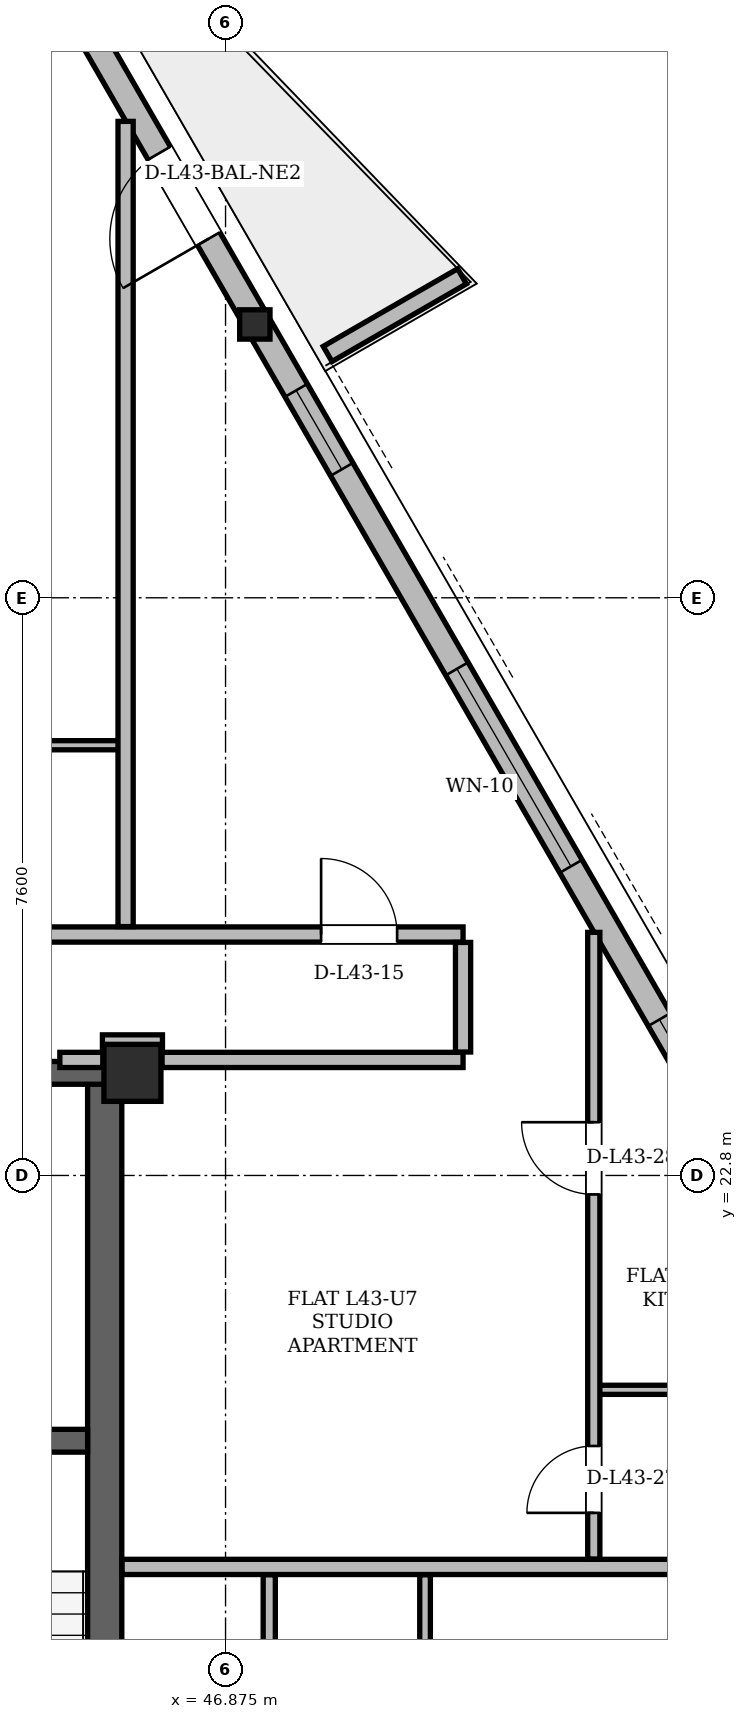
"""IFC4 building model, lengths in metres.
Left out: names, types, materials, properties, quantities, classifications, styles, units other than length and angle.
Written with IfcOpenShell. Run it as: python <this file> out.ifc"""

import sys

from ifc_helpers import new_model, si_unit, direction, frame, frame_2d, origin, origin_2d, place, context, subcontext, project, spatial, polyline, rectangle, hollow_rectangle, i_section, outline, extrude, element, fill, save


model = new_model("IFC4")
c1 = context("Model", 3, precision=1e-05, world=origin(), true_north=direction((0.0, 1.0)))
c2 = subcontext(c1, "Body", "Model", "MODEL_VIEW")
j1 = project(units=[si_unit("LENGTHUNIT", "METRE"), si_unit("PLANEANGLEUNIT", "RADIAN")], contexts=[c1])
p1 = place(None, origin())
s1 = spatial("IfcSite", under=j1, at=p1, CompositionType="ELEMENT")
p2 = place(p1, origin())
s2 = spatial("IfcBuilding", under=s1, at=p2, CompositionType="ELEMENT")
p3 = place(p2, frame((0.0, 0.0, 163.8)))
s3 = spatial("IfcBuildingStorey", under=s2, at=p3, CompositionType="ELEMENT", Elevation=163.8)
p4 = place(p3, frame((45.65, 24.15, 0.0), z_axis=(0.0, 0.0, 1.0), x_axis=(1.0, 0.0, 0.0)))
e1 = element("IfcColumn", 1, at=p4, inside=s3, PredefinedType="COLUMN", context=c2, shape_type="SweptSolid", body=[
    extrude(hollow_rectangle(XDim=0.75, YDim=0.75, WallThickness=0.06, at=origin_2d()), origin(), (0.0, 0.0, 1.0), 3.6),
])
p5 = place(p3, frame((47.296, 34.009, 0.004), z_axis=(-0.019779412159, -0.007272842272, 0.999777915649), x_axis=(0.345107427602, -0.938563190954, 0.0)))
e2 = element("IfcColumn", 2, at=p5, inside=s3, PredefinedType="COLUMN", context=c2, shape_type="SweptSolid", body=[
    extrude(i_section(OverallWidth=0.399, OverallDepth=0.386, WebThickness=0.021, FlangeThickness=0.033, at=origin_2d()), origin(), (0.0, 0.0, 1.0), 3.592),
])
p6 = place(p3, frame((45.285, 11.0, 0.0), z_axis=(0.0, 0.0, 1.0), x_axis=(0.0, 1.0, 0.0)))
e3 = element("IfcWall", 3, at=p6, inside=s3, PredefinedType="SHEAR", context=c2, shape_type="SweptSolid", body=[
    extrude(rectangle(XDim=13.3, YDim=0.45, at=frame_2d((6.65, 0.0))), origin(), (0.0, 0.0, 1.0), 3.38),
])
p7 = place(p3, frame((29.65, 24.15, 0.0), z_axis=(0.0, 0.0, 1.0), x_axis=(1.0, 0.0, 0.0)))
e4 = element("IfcWall", 4, at=p7, inside=s3, PredefinedType="SHEAR", context=c2, shape_type="SweptSolid", body=[
    extrude(rectangle(XDim=15.7, YDim=0.3, at=frame_2d((7.85, 0.0))), origin(), (0.0, 0.0, 1.0), 3.38),
])
p8 = place(p7, frame((1.7, 0.0, 0.0)))
e5 = element("IfcOpeningElement", 5, at=p8, cuts=e4, PredefinedType="OPENING", context=c2, shape_type="SweptSolid", body=[
    extrude(rectangle(XDim=1.2, YDim=2.2, at=frame_2d((0.6, 1.1))), frame((0.0, 0.15, 0.0), z_axis=(0.0, -1.0, 0.0), x_axis=(1.0, 0.0, 0.0)), (0.0, 0.0, 1.0), 0.3),
])
p9 = place(p7, frame((12.8, 0.0, 0.0)))
e6 = element("IfcOpeningElement", 6, at=p9, cuts=e4, PredefinedType="OPENING", context=c2, shape_type="SweptSolid", body=[
    extrude(rectangle(XDim=1.2, YDim=2.2, at=frame_2d((0.6, 1.1))), frame((0.0, 0.15, 0.0), z_axis=(0.0, -1.0, 0.0), x_axis=(1.0, 0.0, 0.0)), (0.0, 0.0, 1.0), 0.3),
])
p10 = place(p7, frame((6.55, 0.0, 0.0)))
e7 = element("IfcOpeningElement", 7, at=p10, cuts=e4, PredefinedType="OPENING", context=c2, shape_type="SweptSolid", body=[
    extrude(rectangle(XDim=0.9, YDim=2.05, at=frame_2d((0.45, 1.025))), frame((0.0, 0.15, 0.0), z_axis=(0.0, -1.0, 0.0), x_axis=(1.0, 0.0, 0.0)), (0.0, 0.0, 1.0), 0.3),
])
p11 = place(p7, frame((8.45, 0.0, 0.0)))
e8 = element("IfcOpeningElement", 8, at=p11, cuts=e4, PredefinedType="OPENING", context=c2, shape_type="SweptSolid", body=[
    extrude(rectangle(XDim=0.9, YDim=2.05, at=frame_2d((0.45, 1.025))), frame((0.0, 0.15, 0.0), z_axis=(0.0, -1.0, 0.0), x_axis=(1.0, 0.0, 0.0)), (0.0, 0.0, 1.0), 0.3),
])
p12 = place(p3, frame((41.05, 19.31, 0.0), z_axis=(0.0, 0.0, 1.0), x_axis=(1.0, 0.0, 0.0)))
e9 = element("IfcWall", 9, at=p12, inside=s3, PredefinedType="SHEAR", context=c2, shape_type="SweptSolid", body=[
    extrude(rectangle(XDim=4.01, YDim=0.3, at=frame_2d((2.005, 0.0))), origin(), (0.0, 0.0, 1.0), 3.38),
])
p13 = place(p12, frame((1.6, 0.0, 0.0)))
e10 = element("IfcOpeningElement", 10, at=p13, cuts=e9, PredefinedType="OPENING", context=c2, shape_type="SweptSolid", body=[
    extrude(rectangle(XDim=1.4, YDim=2.2, at=frame_2d((0.7, 1.1))), frame((0.0, 0.15, 0.0), z_axis=(0.0, -1.0, 0.0), x_axis=(1.0, 0.0, 0.0)), (0.0, 0.0, 1.0), 0.3),
])
p14 = place(p3, frame((59.804, 12.344, 0.0), z_axis=(0.0, 0.0, 1.0), x_axis=(-0.499998611639, 0.866026205354, 0.0)))
e11 = element("IfcWall", 11, at=p14, inside=s3, PredefinedType="SOLIDWALL", context=c2, shape_type="SweptSolid", body=[
    extrude(rectangle(XDim=35.738, YDim=0.34, at=frame_2d((17.869, 0.0))), origin(), (0.0, 0.0, 1.0), 2.6),
])
p15 = place(p14, frame((6.579, 0.0, 0.0)))
e12 = element("IfcOpeningElement", 12, at=p15, cuts=e11, PredefinedType="OPENING", context=c2, shape_type="SweptSolid", body=[
    extrude(rectangle(XDim=1.5, YDim=2.2, at=frame_2d((0.75, 1.1))), frame((0.0, 0.17, 0.0), z_axis=(0.0, -1.0, 0.0), x_axis=(1.0, 0.0, 0.0)), (0.0, 0.0, 1.0), 0.34),
])
p16 = place(p14, frame((26.303, 0.0, 0.0)))
e13 = element("IfcOpeningElement", 13, at=p16, cuts=e11, PredefinedType="OPENING", context=c2, shape_type="SweptSolid", body=[
    extrude(rectangle(XDim=1.3, YDim=2.2, at=frame_2d((0.65, 1.1))), frame((0.0, 0.17, 0.0), z_axis=(0.0, -1.0, 0.0), x_axis=(1.0, 0.0, 0.0)), (0.0, 0.0, 1.0), 0.34),
])
p17 = place(p14, frame((1.58, 0.0, 0.85)))
e14 = element("IfcOpeningElement", 14, at=p17, cuts=e11, PredefinedType="OPENING", context=c2, shape_type="SweptSolid", body=[
    extrude(rectangle(XDim=1.2, YDim=1.48, at=frame_2d((0.6, 0.74))), frame((0.0, 0.17, 0.0), z_axis=(0.0, -1.0, 0.0), x_axis=(1.0, 0.0, 0.0)), (0.0, 0.0, 1.0), 0.34),
])
p18 = place(p14, frame((16.77, 0.0, 0.85)))
e15 = element("IfcOpeningElement", 15, at=p18, cuts=e11, PredefinedType="OPENING", context=c2, shape_type="SweptSolid", body=[
    extrude(rectangle(XDim=3.0, YDim=1.64, at=frame_2d((1.5, 0.82))), frame((0.0, 0.17, 0.0), z_axis=(0.0, -1.0, 0.0), x_axis=(1.0, 0.0, 0.0)), (0.0, 0.0, 1.0), 0.34),
])
p19 = place(p14, frame((22.8, 0.0, 0.85)))
e16 = element("IfcOpeningElement", 16, at=p19, cuts=e11, PredefinedType="OPENING", context=c2, shape_type="SweptSolid", body=[
    extrude(rectangle(XDim=1.2, YDim=1.48, at=frame_2d((0.6, 0.74))), frame((0.0, 0.17, 0.0), z_axis=(0.0, -1.0, 0.0), x_axis=(1.0, 0.0, 0.0)), (0.0, 0.0, 1.0), 0.34),
])
p20 = place(p14, frame((13.242, 0.0, 0.85)))
e17 = element("IfcOpeningElement", 17, at=p20, cuts=e11, PredefinedType="OPENING", context=c2, shape_type="SweptSolid", body=[
    extrude(rectangle(XDim=1.2, YDim=1.48, at=frame_2d((0.6, 0.74))), frame((0.0, 0.17, 0.0), z_axis=(0.0, -1.0, 0.0), x_axis=(1.0, 0.0, 0.0)), (0.0, 0.0, 1.0), 0.34),
])
p21 = place(p14, frame((31.395, 0.0, 0.85)))
e18 = element("IfcOpeningElement", 18, at=p21, cuts=e11, PredefinedType="OPENING", context=c2, shape_type="SweptSolid", body=[
    extrude(rectangle(XDim=3.0, YDim=1.64, at=frame_2d((1.5, 0.82))), frame((0.0, 0.17, 0.0), z_axis=(0.0, -1.0, 0.0), x_axis=(1.0, 0.0, 0.0)), (0.0, 0.0, 1.0), 0.34),
])
p22 = place(p3, frame((48.218, 33.608, 0.0), z_axis=(0.0, 0.0, 1.0), x_axis=(0.866012356593, 0.500022597718, 0.0)))
e19 = element("IfcWall", 19, at=p22, inside=s3, PredefinedType="PARAPET", context=c2, shape_type="SweptSolid", body=[
    extrude(outline(polyline([(0.0, 0.0), (2.042, 0.0), (2.042, 1.1), (0.0, 1.32), (0.0, 0.0)])), frame((0.0, 0.115, 0.0), z_axis=(0.0, -1.0, 0.0), x_axis=(1.0, 0.0, 0.0)), (0.0, 0.0, 1.0), 0.23),
])
p23 = place(p3, frame((45.514, 17.65, 0.0), z_axis=(0.0, 0.0, 1.0), x_axis=(1.0, 0.0, 0.0)))
e20 = element("IfcWall", 20, at=p23, inside=s3, PredefinedType="PARTITIONING", context=c2, shape_type="SweptSolid", body=[
    extrude(rectangle(XDim=11.026, YDim=0.2, at=frame_2d((5.513, 0.0))), origin(), (0.0, 0.0, 1.0), 2.42),
])
p24 = place(p3, frame((51.724, 19.98, 0.0), z_axis=(0.0, 0.0, 1.0), x_axis=(1.0, 0.0, 0.0)))
e21 = element("IfcWall", 21, at=p24, inside=s3, PredefinedType="PARTITIONING", context=c2, shape_type="SweptSolid", body=[
    extrude(rectangle(XDim=3.47, YDim=0.12, at=frame_2d((1.735, 0.0))), origin(), (0.0, 0.0, 1.0), 3.38),
])
p25 = place(p3, frame((44.695, 24.32, 0.0), z_axis=(0.0, 0.0, 1.0), x_axis=(1.0, 0.0, 0.0)))
e22 = element("IfcWall", 22, at=p25, inside=s3, PredefinedType="PARTITIONING", context=c2, shape_type="SweptSolid", body=[
    extrude(rectangle(XDim=0.565, YDim=0.2, at=frame_2d((0.282, 0.0))), origin(), (0.0, 0.0, 1.0), 2.42),
])
p26 = place(p3, frame((46.04, 24.32, 0.0), z_axis=(0.0, 0.0, 1.0), x_axis=(1.0, 0.0, 0.0)))
e23 = element("IfcWall", 23, at=p26, inside=s3, PredefinedType="PARTITIONING", context=c2, shape_type="SweptSolid", body=[
    extrude(rectangle(XDim=3.96, YDim=0.2, at=frame_2d((1.98, 0.0))), origin(), (0.0, 0.0, 1.0), 3.38),
])
p27 = place(p3, frame((45.255, 24.55, 0.0), z_axis=(0.0, 0.0, 1.0), x_axis=(1.0, 0.0, 0.0)))
e24 = element("IfcWall", 24, at=p27, inside=s3, PredefinedType="PARTITIONING", context=c2, shape_type="SweptSolid", body=[
    extrude(rectangle(XDim=0.79, YDim=0.2, at=frame_2d((0.395, 0.0))), origin(), (0.0, 0.0, 1.0), 2.842),
])
p28 = place(p3, frame((38.3, 25.97, 0.0), z_axis=(0.0, 0.0, 1.0), x_axis=(1.0, 0.0, 0.0)))
e25 = element("IfcWall", 25, at=p28, inside=s3, PredefinedType="PARTITIONING", context=c2, shape_type="SweptSolid", body=[
    extrude(rectangle(XDim=11.7, YDim=0.2, at=frame_2d((5.85, 0.0))), origin(), (0.0, 0.0, 1.0), 2.842),
])
p29 = place(p28, frame((9.832, 0.0, 0.0)))
e26 = element("IfcOpeningElement", 26, at=p29, cuts=e25, PredefinedType="OPENING", context=c2, shape_type="SweptSolid", body=[
    extrude(rectangle(XDim=1.0, YDim=2.18, at=frame_2d((0.5, 1.09))), frame((0.0, 0.1, 0.0), z_axis=(0.0, -1.0, 0.0), x_axis=(1.0, 0.0, 0.0)), (0.0, 0.0, 1.0), 0.2),
])
p30 = place(p3, frame((38.218, 28.46, 0.0), z_axis=(0.0, 0.0, 1.0), x_axis=(1.0, 0.0, 0.0)))
e27 = element("IfcWall", 27, at=p30, inside=s3, PredefinedType="PARTITIONING", context=c2, shape_type="SweptSolid", body=[
    extrude(rectangle(XDim=7.424, YDim=0.12, at=frame_2d((3.712, 0.0))), origin(), (0.0, 0.0, 1.0), 3.38),
])
p31 = place(p30, frame((3.272, 0.0, 0.0)))
e28 = element("IfcOpeningElement", 28, at=p31, cuts=e27, PredefinedType="OPENING", context=c2, shape_type="SweptSolid", body=[
    extrude(rectangle(XDim=0.88, YDim=2.08, at=frame_2d((0.44, 1.04))), frame((0.0, 0.06, 0.0), z_axis=(0.0, -1.0, 0.0), x_axis=(1.0, 0.0, 0.0)), (0.0, 0.0, 1.0), 0.12),
])
p32 = place(p3, frame((45.56, 26.074, 0.0), z_axis=(0.0, 0.0, 1.0), x_axis=(0.0, 1.0, 0.0)))
e29 = element("IfcWall", 29, at=p32, inside=s3, PredefinedType="PARTITIONING", context=c2, shape_type="SweptSolid", body=[
    extrude(rectangle(XDim=10.594, YDim=0.2, at=frame_2d((5.297, 0.0))), origin(), (0.0, 0.0, 1.0), 3.38),
])
p33 = place(p3, frame((47.45, 13.104, 0.0), z_axis=(0.0, 0.0, 1.0), x_axis=(0.0, 1.0, 0.0)))
e30 = element("IfcWall", 30, at=p33, inside=s3, PredefinedType="PARTITIONING", context=c2, shape_type="SweptSolid", body=[
    extrude(rectangle(XDim=4.442, YDim=0.16, at=frame_2d((2.221, 0.0))), origin(), (0.0, 0.0, 1.0), 3.38),
])
p34 = place(p3, frame((49.5, 13.104, 0.0), z_axis=(0.0, 0.0, 1.0), x_axis=(0.0, 1.0, 0.0)))
e31 = element("IfcWall", 31, at=p34, inside=s3, PredefinedType="PARTITIONING", context=c2, shape_type="SweptSolid", body=[
    extrude(rectangle(XDim=4.442, YDim=0.14, at=frame_2d((2.221, 0.0))), origin(), (0.0, 0.0, 1.0), 3.38),
])
p35 = place(p3, frame((50.0, 24.424, 0.0), z_axis=(0.0, 0.0, 1.0), x_axis=(0.0, 1.0, 0.0)))
e32 = element("IfcWall", 32, at=p35, inside=s3, PredefinedType="PARTITIONING", context=c2, shape_type="SweptSolid", body=[
    extrude(rectangle(XDim=1.442, YDim=0.2, at=frame_2d((0.721, 0.0))), origin(), (0.0, 0.0, 1.0), 3.38),
])
p36 = place(p3, frame((51.72, 17.754, 0.0), z_axis=(0.0, 0.0, 1.0), x_axis=(0.0, 1.0, 0.0)))
e33 = element("IfcWall", 33, at=p36, inside=s3, PredefinedType="PARTITIONING", context=c2, shape_type="SweptSolid", body=[
    extrude(rectangle(XDim=8.244, YDim=0.16, at=frame_2d((4.122, 0.0))), origin(), (0.0, 0.0, 1.0), 3.38),
])
p37 = place(p36, frame((0.607, 0.0, 0.0)))
e34 = element("IfcOpeningElement", 34, at=p37, cuts=e33, PredefinedType="OPENING", context=c2, shape_type="SweptSolid", body=[
    extrude(rectangle(XDim=0.88, YDim=2.08, at=frame_2d((0.44, 1.04))), frame((0.0, 0.08, 0.0), z_axis=(0.0, -1.0, 0.0), x_axis=(1.0, 0.0, 0.0)), (0.0, 0.0, 1.0), 0.16),
])
p38 = place(p36, frame((4.797, 0.0, 0.0)))
e35 = element("IfcOpeningElement", 35, at=p38, cuts=e33, PredefinedType="OPENING", context=c2, shape_type="SweptSolid", body=[
    extrude(rectangle(XDim=0.95, YDim=2.1, at=frame_2d((0.475, 1.05))), frame((0.0, 0.08, 0.0), z_axis=(0.0, -1.0, 0.0), x_axis=(1.0, 0.0, 0.0)), (0.0, 0.0, 1.0), 0.16),
])
p39 = place(p16, origin())
e36 = element("IfcDoor", 36, at=p39, inside=s3, OperationType="SINGLE_SWING_LEFT", PredefinedType="DOOR", context=c2, shape_type="SweptSolid", body=[
    extrude(rectangle(XDim=1.3, YDim=2.2, at=frame_2d((0.65, 1.1))), frame((0.0, 0.025, 0.0), z_axis=(0.0, -1.0, 0.0), x_axis=(1.0, 0.0, 0.0)), (0.0, 0.0, 1.0), 0.05),
])
fill(e13, e36)
p40 = place(p18, origin())
e37 = element("IfcWindow", 37, at=p40, inside=s3, PartitioningType="SINGLE_PANEL", PredefinedType="WINDOW", context=c2, shape_type="SweptSolid", body=[
    extrude(rectangle(XDim=3.0, YDim=1.64, at=frame_2d((1.5, 0.82))), frame((0.0, 0.03, 0.0), z_axis=(0.0, -1.0, 0.0), x_axis=(1.0, 0.0, 0.0)), (0.0, 0.0, 1.0), 0.06),
])
fill(e15, e37)
p41 = place(p19, origin())
e38 = element("IfcWindow", 38, at=p41, inside=s3, PartitioningType="SINGLE_PANEL", PredefinedType="WINDOW", context=c2, shape_type="SweptSolid", body=[
    extrude(rectangle(XDim=1.2, YDim=1.48, at=frame_2d((0.6, 0.74))), frame((0.0, 0.03, 0.0), z_axis=(0.0, -1.0, 0.0), x_axis=(1.0, 0.0, 0.0)), (0.0, 0.0, 1.0), 0.06),
])
fill(e16, e38)
p42 = place(p20, origin())
e39 = element("IfcWindow", 39, at=p42, inside=s3, PartitioningType="SINGLE_PANEL", PredefinedType="WINDOW", context=c2, shape_type="SweptSolid", body=[
    extrude(rectangle(XDim=1.2, YDim=1.48, at=frame_2d((0.6, 0.74))), frame((0.0, 0.03, 0.0), z_axis=(0.0, -1.0, 0.0), x_axis=(1.0, 0.0, 0.0)), (0.0, 0.0, 1.0), 0.06),
])
fill(e17, e39)
p43 = place(p29, origin())
e40 = element("IfcDoor", 40, at=p43, inside=s3, OperationType="SINGLE_SWING_LEFT", PredefinedType="DOOR", context=c2, shape_type="SweptSolid", body=[
    extrude(rectangle(XDim=1.0, YDim=2.18, at=frame_2d((0.5, 1.09))), frame((0.0, 0.025, 0.0), z_axis=(0.0, -1.0, 0.0), x_axis=(1.0, 0.0, 0.0)), (0.0, 0.0, 1.0), 0.05),
])
fill(e26, e40)
p44 = place(p37, origin())
e41 = element("IfcDoor", 41, at=p44, inside=s3, OperationType="SINGLE_SWING_LEFT", PredefinedType="DOOR", context=c2, shape_type="SweptSolid", body=[
    extrude(rectangle(XDim=0.88, YDim=2.08, at=frame_2d((0.44, 1.04))), frame((0.0, 0.025, 0.0), z_axis=(0.0, -1.0, 0.0), x_axis=(1.0, 0.0, 0.0)), (0.0, 0.0, 1.0), 0.05),
])
fill(e34, e41)
p45 = place(p38, origin())
e42 = element("IfcDoor", 42, at=p45, inside=s3, OperationType="SINGLE_SWING_RIGHT", PredefinedType="DOOR", context=c2, shape_type="SweptSolid", body=[
    extrude(rectangle(XDim=0.95, YDim=2.1, at=frame_2d((0.475, 1.05))), frame((0.0, 0.025, 0.0), z_axis=(0.0, -1.0, 0.0), x_axis=(1.0, 0.0, 0.0)), (0.0, 0.0, 1.0), 0.05),
])
fill(e35, e42)
save(model, sys.argv[1])
